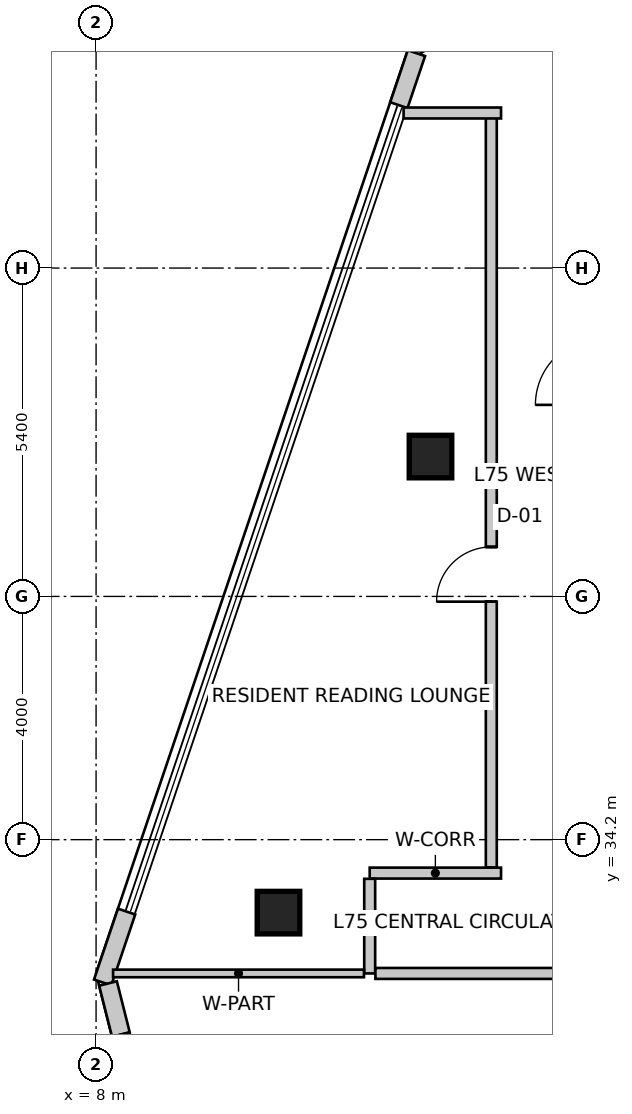
"""IFC4 building model, lengths in metres.
Left out: names, types, materials, properties, quantities, classifications, styles, units other than length and angle.
Written with IfcOpenShell. Run it as: python <this file> out.ifc"""

import sys

from ifc_helpers import new_model, si_unit, direction, frame, frame_2d, origin, origin_2d, place, context, subcontext, project, spatial, rectangle, extrude, source, transform, mapped, element, fill, save


model = new_model("IFC4")
c1 = context("Model", 3, precision=1e-05, world=origin(), true_north=direction((0.0, 1.0)))
c2 = subcontext(c1, "Body", "Model", "MODEL_VIEW")
j1 = project(units=[si_unit("LENGTHUNIT", "METRE"), si_unit("PLANEANGLEUNIT", "RADIAN")], contexts=[c1])
p1 = place(None, origin())
s1 = spatial("IfcSite", under=j1, at=p1, CompositionType="ELEMENT")
p2 = place(p1, origin())
s2 = spatial("IfcBuilding", under=s1, at=p2, CompositionType="ELEMENT")
p3 = place(p2, frame((0.0, 0.0, 292.5)))
s3 = spatial("IfcBuildingStorey", under=s2, at=p3, CompositionType="ELEMENT", Elevation=292.5)
m1 = source(origin(), c2, "Body", "SweptSolid", [
    extrude(rectangle(XDim=0.7, YDim=0.7, at=origin_2d()), origin(), (0.0, 0.0, 1.0), 4.0),
])
for number, where, z_axis, x_axis in (
    (1, (11.0, 33.0, 0.0), (0.0, 0.0, 1.0), (1.0, 0.0, 0.0)),
    (2, (13.5, 40.5, 0.0), (0.0, 0.0, 1.0), (1.0, 0.0, 0.0)),
):
    element("IfcColumn", number, at=place(p3, frame(where, z_axis=z_axis, x_axis=x_axis)), inside=s3, PredefinedType="COLUMN", context=c2, shape_type="MappedRepresentation", body=[
        mapped(m1, transform((0.0, 0.0, 0.0), scale=1.0)),
    ])
p4 = place(p3, frame((21.873, 52.741, 0.0), z_axis=(0.0, 0.0, 1.0), x_axis=(-0.843661487732, -0.536875492193, 0.0)))
e3 = element("IfcWall", 3, at=p4, inside=s3, PredefinedType="SOLIDWALL", context=c2, shape_type="SweptSolid", body=[
    extrude(rectangle(XDim=10.282, YDim=0.3, at=frame_2d((5.141, 0.0))), origin(), (0.0, 0.0, 1.0), 3.75),
])
m2 = source(origin(), c2, "Body", "SweptSolid", [
    extrude(rectangle(XDim=2.8, YDim=2.4, at=frame_2d((1.4, 1.2))), frame((0.0, 0.16, 0.0), z_axis=(0.0, -1.0, 0.0), x_axis=(1.0, 0.0, 0.0)), (0.0, 0.0, 1.0), 0.32),
])
p5 = place(p4, frame((1.06, 0.0, 0.85)))
e4 = element("IfcOpeningElement", 4, at=p5, cuts=e3, PredefinedType="OPENING", context=c2, shape_type="MappedRepresentation", body=[
    mapped(m2, transform((0.0, 0.0, 0.0), scale=1.0)),
])
m3 = source(origin(), c2, "Body", "SweptSolid", [
    extrude(rectangle(XDim=2.4, YDim=2.2, at=frame_2d((1.2, 1.1))), frame((0.0, 0.16, 0.0), z_axis=(0.0, -1.0, 0.0), x_axis=(1.0, 0.0, 0.0)), (0.0, 0.0, 1.0), 0.32),
])
p6 = place(p4, frame((5.539, 0.0, 0.85)))
e5 = element("IfcOpeningElement", 5, at=p6, cuts=e3, PredefinedType="OPENING", context=c2, shape_type="MappedRepresentation", body=[
    mapped(m3, transform((0.0, 0.0, 0.0), scale=1.0)),
])
p7 = place(p3, frame((13.269, 47.134, 0.0), z_axis=(0.0, 0.0, 1.0), x_axis=(-0.31995770778, -0.947431826166, 0.0)))
e6 = element("IfcWall", 6, at=p7, inside=s3, PredefinedType="SOLIDWALL", context=c2, shape_type="SweptSolid", body=[
    extrude(rectangle(XDim=0.903, YDim=0.3, at=frame_2d((0.451, 0.0))), origin(), (0.0, 0.0, 1.0), 3.75),
])
p8 = place(p3, frame((8.502, 33.017, 0.0), z_axis=(0.0, 0.0, 1.0), x_axis=(-0.319798692732, -0.947485512357, 0.0)))
e7 = element("IfcWall", 7, at=p8, inside=s3, PredefinedType="SOLIDWALL", context=c2, shape_type="SweptSolid", body=[
    extrude(rectangle(XDim=1.23, YDim=0.3, at=frame_2d((0.615, 0.0))), origin(), (0.0, 0.0, 1.0), 3.75),
])
p9 = place(p3, frame((8.196, 31.835, 0.0), z_axis=(0.0, 0.0, 1.0), x_axis=(0.244430846523, -0.969666726906, 0.0)))
e8 = element("IfcWall", 8, at=p9, inside=s3, PredefinedType="SOLIDWALL", context=c2, shape_type="SweptSolid", body=[
    extrude(rectangle(XDim=7.152, YDim=0.3, at=frame_2d((3.576, 0.0))), origin(), (0.0, 0.0, 1.0), 3.75),
])
p10 = place(p9, frame((0.866, 0.0, 0.85)))
e9 = element("IfcOpeningElement", 9, at=p10, cuts=e8, PredefinedType="OPENING", context=c2, shape_type="MappedRepresentation", body=[
    mapped(m2, transform((0.0, 0.0, 0.0), scale=1.0)),
])
m4 = source(origin(), c2, "Body", "SweptSolid", [
    extrude(rectangle(XDim=2.1, YDim=2.0, at=frame_2d((1.05, 1.0))), frame((0.0, 0.16, 0.0), z_axis=(0.0, -1.0, 0.0), x_axis=(1.0, 0.0, 0.0)), (0.0, 0.0, 1.0), 0.32),
])
p11 = place(p9, frame((4.692, 0.0, 0.85)))
e10 = element("IfcOpeningElement", 10, at=p11, cuts=e8, PredefinedType="OPENING", context=c2, shape_type="MappedRepresentation", body=[
    mapped(m4, transform((0.0, 0.0, 0.0), scale=1.0)),
])
p12 = place(p3, frame((12.5, 33.65, 0.0), z_axis=(0.0, 0.0, 1.0), x_axis=(1.0, 0.0, 0.0)))
e11 = element("IfcWall", 11, at=p12, inside=s3, PredefinedType="PARTITIONING", context=c2, shape_type="SweptSolid", body=[
    extrude(rectangle(XDim=2.16, YDim=0.18, at=frame_2d((1.08, 0.0))), origin(), (0.0, 0.0, 1.0), 3.75),
])
p13 = place(p3, frame((12.5, 32.0, 0.0), z_axis=(0.0, 0.0, 1.0), x_axis=(0.0, 1.0, 0.0)))
e12 = element("IfcWall", 12, at=p13, inside=s3, PredefinedType="PARTITIONING", context=c2, shape_type="SweptSolid", body=[
    extrude(rectangle(XDim=1.556, YDim=0.18, at=frame_2d((0.778, 0.0))), origin(), (0.0, 0.0, 1.0), 3.335),
])
p14 = place(p3, frame((26.065, 32.0, 0.0), z_axis=(0.0, 0.0, 1.0), x_axis=(-1.0, 0.0, 0.0)))
e13 = element("IfcWall", 13, at=p14, inside=s3, PredefinedType="PARTITIONING", context=c2, shape_type="SweptSolid", body=[
    extrude(rectangle(XDim=13.471, YDim=0.18, at=frame_2d((6.736, 0.0))), origin(), (0.0, 0.0, 1.0), 3.335),
])
m5 = source(origin(), c2, "Body", "SweptSolid", [
    extrude(rectangle(XDim=1.6, YDim=2.15, at=frame_2d((0.8, 1.075))), frame((0.0, 0.1, 0.0), z_axis=(0.0, -1.0, 0.0), x_axis=(1.0, 0.0, 0.0)), (0.0, 0.0, 1.0), 0.2),
])
p15 = place(p14, frame((5.936, 0.0, 0.0)))
e14 = element("IfcOpeningElement", 14, at=p15, cuts=e13, PredefinedType="OPENING", context=c2, shape_type="MappedRepresentation", body=[
    mapped(m5, transform((0.0, 0.0, 0.0), scale=1.0)),
])
p16 = place(p3, frame((14.5, 33.744, 0.0), z_axis=(0.0, 0.0, 1.0), x_axis=(0.0, 1.0, 0.0)))
e15 = element("IfcWall", 15, at=p16, inside=s3, PredefinedType="PARTITIONING", context=c2, shape_type="SweptSolid", body=[
    extrude(rectangle(XDim=12.406, YDim=0.18, at=frame_2d((6.203, 0.0))), origin(), (0.0, 0.0, 1.0), 3.75),
])
m6 = source(origin(), c2, "Body", "SweptSolid", [
    extrude(rectangle(XDim=0.9, YDim=2.15, at=frame_2d((0.45, 1.075))), frame((0.0, 0.1, 0.0), z_axis=(0.0, -1.0, 0.0), x_axis=(1.0, 0.0, 0.0)), (0.0, 0.0, 1.0), 0.2),
])
p17 = place(p16, frame((4.37, 0.0, 0.0)))
e16 = element("IfcOpeningElement", 16, at=p17, cuts=e15, PredefinedType="OPENING", context=c2, shape_type="MappedRepresentation", body=[
    mapped(m6, transform((0.0, 0.0, 0.0), scale=1.0)),
])
p18 = place(p3, frame((14.66, 46.15, 0.0), z_axis=(0.0, 0.0, 1.0), x_axis=(-1.0, 0.0, 0.0)))
e17 = element("IfcWall", 17, at=p18, inside=s3, PredefinedType="PARTITIONING", context=c2, shape_type="SweptSolid", body=[
    extrude(rectangle(XDim=1.602, YDim=0.18, at=frame_2d((0.801, 0.0))), origin(), (0.0, 0.0, 1.0), 3.75),
])
p19 = place(p3, frame((12.406, 32.0, 0.0), z_axis=(0.0, 0.0, 1.0), x_axis=(-1.0, 0.0, 0.0)))
e18 = element("IfcWall", 18, at=p19, inside=s3, PredefinedType="PARTITIONING", context=c2, shape_type="SweptSolid", body=[
    extrude(rectangle(XDim=4.126, YDim=0.125, at=frame_2d((2.063, 0.0))), origin(), (0.0, 0.0, 1.0), 3.042),
])
m7 = source(origin(), c2, "Body", "SweptSolid", [
    extrude(rectangle(XDim=0.9, YDim=2.15, at=frame_2d((0.45, 1.075))), frame((0.0, 0.025, 0.0), z_axis=(0.0, -1.0, 0.0), x_axis=(1.0, 0.0, 0.0)), (0.0, 0.0, 1.0), 0.05),
])
p20 = place(p17, origin())
e19 = element("IfcDoor", 19, at=p20, inside=s3, OperationType="SINGLE_SWING_LEFT", PredefinedType="DOOR", context=c2, shape_type="MappedRepresentation", body=[
    mapped(m7, transform((0.0, 0.0, 0.0), scale=1.0)),
])
fill(e16, e19)
save(model, sys.argv[1])
